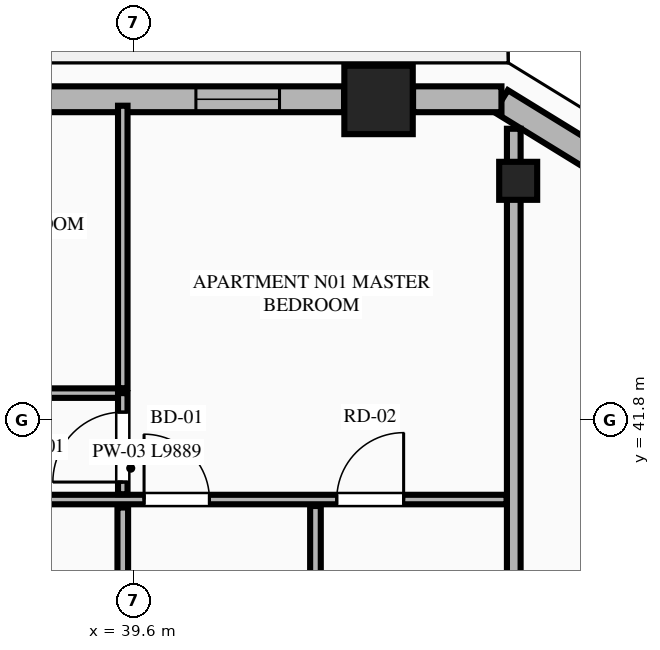
"""IFC4 building model, lengths in metres.
Left out: names, types, materials, properties, quantities, classifications, styles, units other than length and angle.
Written with IfcOpenShell. Run it as: python <this file> out.ifc"""

import sys

from ifc_helpers import new_model, si_unit, direction, frame, frame_2d, origin, origin_2d, place, context, subcontext, project, spatial, rectangle, extrude, element, fill, save


model = new_model("IFC4")
c1 = context("Model", 3, precision=1e-05, world=origin(), true_north=direction((0.0, 1.0)))
c2 = subcontext(c1, "Body", "Model", "MODEL_VIEW")
j1 = project(units=[si_unit("LENGTHUNIT", "METRE"), si_unit("PLANEANGLEUNIT", "RADIAN")], contexts=[c1])
p1 = place(None, origin())
s1 = spatial("IfcSite", under=j1, at=p1, CompositionType="ELEMENT")
p2 = place(p1, origin())
s2 = spatial("IfcBuilding", under=s1, at=p2, CompositionType="ELEMENT")
p3 = place(p2, frame((0.0, 0.0, 186.1)))
s3 = spatial("IfcBuildingStorey", under=s2, at=p3, CompositionType="ELEMENT", Elevation=186.1)
p4 = place(p3, frame((42.821, 46.011, 0.0), z_axis=(0.0, 0.0, 1.0), x_axis=(1.0, 0.0, 0.0)))
e1 = element("IfcColumn", 1, at=p4, inside=s3, PredefinedType="COLUMN", context=c2, shape_type="SweptSolid", body=[
    extrude(rectangle(XDim=0.9, YDim=0.9, at=origin_2d()), origin(), (0.0, 0.0, 1.0), 3.55),
])
p5 = place(p3, frame((44.658, 44.947, 0.0), z_axis=(0.0, 0.0, 1.0), x_axis=(-0.865230187018, 0.501374833306, 0.0)))
e2 = element("IfcColumn", 2, at=p5, inside=s3, PredefinedType="PILASTER", context=c2, shape_type="SweptSolid", body=[
    extrude(rectangle(XDim=0.5, YDim=0.35, at=origin_2d()), origin(), (0.0, 0.0, 1.0), 3.55),
])
p6 = place(p3, frame((45.862, 45.116, 0.0), z_axis=(0.0, 0.0, 1.0), x_axis=(-0.851713271379, 0.524008113828, 0.0)))
e3 = element("IfcWall", 3, at=p6, inside=s3, PredefinedType="STANDARD", context=c2, shape_type="SweptSolid", body=[
    extrude(rectangle(XDim=1.678, YDim=0.34, at=frame_2d((0.839, 0.0))), origin(), (0.0, 0.0, 1.0), 3.35),
])
p7 = place(p3, frame((44.438, 46.02, 0.0), z_axis=(0.0, 0.0, 1.0), x_axis=(-1.0, 0.0, 0.0)))
e4 = element("IfcWall", 4, at=p7, inside=s3, PredefinedType="STANDARD", context=c2, shape_type="SweptSolid", body=[
    extrude(rectangle(XDim=1.163, YDim=0.34, at=frame_2d((0.582, 0.0))), origin(), (0.0, 0.0, 1.0), 3.35),
])
p8 = place(p3, frame((42.367, 46.02, 0.0), z_axis=(0.0, 0.0, 1.0), x_axis=(-1.0, 0.0, 0.0)))
e5 = element("IfcWall", 5, at=p8, inside=s3, PredefinedType="STANDARD", context=c2, shape_type="SweptSolid", body=[
    extrude(rectangle(XDim=5.97, YDim=0.34, at=frame_2d((2.985, 0.0))), origin(), (0.0, 0.0, 1.0), 2.883),
])
p9 = place(p8, frame((0.849, 0.0, 0.75)))
e6 = element("IfcOpeningElement", 6, at=p9, cuts=e5, PredefinedType="OPENING", context=c2, shape_type="SweptSolid", body=[
    extrude(rectangle(XDim=1.1, YDim=1.983, at=frame_2d((0.55, 0.991))), frame((0.0, 0.18, 0.0), z_axis=(0.0, -1.0, 0.0), x_axis=(1.0, 0.0, 0.0)), (0.0, 0.0, 1.0), 0.36),
])
p10 = place(p8, frame((3.947, 0.0, 0.75)))
e7 = element("IfcOpeningElement", 7, at=p10, cuts=e5, PredefinedType="OPENING", context=c2, shape_type="SweptSolid", body=[
    extrude(rectangle(XDim=1.1, YDim=1.983, at=frame_2d((0.55, 0.991))), frame((0.0, 0.18, 0.0), z_axis=(0.0, -1.0, 0.0), x_axis=(1.0, 0.0, 0.0)), (0.0, 0.0, 1.0), 0.36),
])
p11 = place(p3, frame((44.6, 35.15, 0.0), z_axis=(0.0, 0.0, 1.0), x_axis=(0.0, 1.0, 0.0)))
e8 = element("IfcWall", 8, at=p11, inside=s3, PredefinedType="PARTITIONING", context=c2, shape_type="SweptSolid", body=[
    extrude(rectangle(XDim=10.482, YDim=0.18, at=frame_2d((5.241, 0.0))), origin(), (0.0, 0.0, 1.0), 3.35),
])
p12 = place(p3, frame((34.616, 40.754, 0.0), z_axis=(0.0, 0.0, 1.0), x_axis=(1.0, 0.0, 0.0)))
e9 = element("IfcWall", 9, at=p12, inside=s3, PredefinedType="PARTITIONING", context=c2, shape_type="SweptSolid", body=[
    extrude(rectangle(XDim=9.889, YDim=0.125, at=frame_2d((4.944, 0.0))), origin(), (0.0, 0.0, 1.0), 3.35),
])
p13 = place(p12, frame((5.12, 0.0, 0.0)))
e10 = element("IfcOpeningElement", 10, at=p13, cuts=e9, PredefinedType="OPENING", context=c2, shape_type="SweptSolid", body=[
    extrude(rectangle(XDim=0.86, YDim=2.1, at=frame_2d((0.43, 1.05))), frame((0.0, 0.073, 0.0), z_axis=(0.0, -1.0, 0.0), x_axis=(1.0, 0.0, 0.0)), (0.0, 0.0, 1.0), 0.145),
])
p14 = place(p12, frame((7.655, 0.0, 0.0)))
e11 = element("IfcOpeningElement", 11, at=p14, cuts=e9, PredefinedType="OPENING", context=c2, shape_type="SweptSolid", body=[
    extrude(rectangle(XDim=0.88, YDim=2.15, at=frame_2d((0.44, 1.075))), frame((0.0, 0.073, 0.0), z_axis=(0.0, -1.0, 0.0), x_axis=(1.0, 0.0, 0.0)), (0.0, 0.0, 1.0), 0.145),
])
p15 = place(p12, frame((0.3, 0.0, 0.0)))
e12 = element("IfcOpeningElement", 12, at=p15, cuts=e9, PredefinedType="OPENING", context=c2, shape_type="SweptSolid", body=[
    extrude(rectangle(XDim=0.88, YDim=2.15, at=frame_2d((0.44, 1.075))), frame((0.0, 0.073, 0.0), z_axis=(0.0, -1.0, 0.0), x_axis=(1.0, 0.0, 0.0)), (0.0, 0.0, 1.0), 0.145),
])
p16 = place(p3, frame((29.472, 42.154, 0.0), z_axis=(0.0, 0.0, 1.0), x_axis=(1.0, 0.0, 0.0)))
e13 = element("IfcWall", 13, at=p16, inside=s3, PredefinedType="PARTITIONING", context=c2, shape_type="SweptSolid", body=[
    extrude(rectangle(XDim=9.984, YDim=0.125, at=frame_2d((4.992, 0.0))), origin(), (0.0, 0.0, 1.0), 3.35),
])
p17 = place(p16, frame((0.35, 0.0, 0.0)))
e14 = element("IfcOpeningElement", 14, at=p17, cuts=e13, PredefinedType="OPENING", context=c2, shape_type="SweptSolid", body=[
    extrude(rectangle(XDim=0.92, YDim=2.15, at=frame_2d((0.46, 1.075))), frame((0.0, 0.073, 0.0), z_axis=(0.0, -1.0, 0.0), x_axis=(1.0, 0.0, 0.0)), (0.0, 0.0, 1.0), 0.145),
])
p18 = place(p16, frame((5.494, 0.0, 0.0)))
e15 = element("IfcOpeningElement", 15, at=p18, cuts=e13, PredefinedType="OPENING", context=c2, shape_type="SweptSolid", body=[
    extrude(rectangle(XDim=0.92, YDim=2.15, at=frame_2d((0.46, 1.075))), frame((0.0, 0.073, 0.0), z_axis=(0.0, -1.0, 0.0), x_axis=(1.0, 0.0, 0.0)), (0.0, 0.0, 1.0), 0.145),
])
p19 = place(p3, frame((39.456, 40.824, 0.0), z_axis=(0.0, 0.0, 1.0), x_axis=(0.0, 1.0, 0.0)))
e16 = element("IfcWall", 16, at=p19, inside=s3, PredefinedType="PARTITIONING", context=c2, shape_type="SweptSolid", body=[
    extrude(rectangle(XDim=1.33, YDim=0.125, at=frame_2d((0.665, 0.0))), origin(), (0.0, 0.0, 1.0), 3.35),
])
p20 = place(p19, frame((0.16, 0.0, 0.0)))
e17 = element("IfcOpeningElement", 17, at=p20, cuts=e16, PredefinedType="OPENING", context=c2, shape_type="SweptSolid", body=[
    extrude(rectangle(XDim=0.92, YDim=2.15, at=frame_2d((0.46, 1.075))), frame((0.0, 0.073, 0.0), z_axis=(0.0, -1.0, 0.0), x_axis=(1.0, 0.0, 0.0)), (0.0, 0.0, 1.0), 0.145),
])
p21 = place(p3, frame((39.456, 42.219, 0.0), z_axis=(0.0, 0.0, 1.0), x_axis=(0.0, 1.0, 0.0)))
e18 = element("IfcWall", 18, at=p21, inside=s3, PredefinedType="PARTITIONING", context=c2, shape_type="SweptSolid", body=[
    extrude(rectangle(XDim=3.716, YDim=0.125, at=frame_2d((1.858, 0.0))), origin(), (0.0, 0.0, 1.0), 3.35),
])
p22 = place(p3, frame((39.456, 35.235, 0.0), z_axis=(0.0, 0.0, 1.0), x_axis=(0.0, 1.0, 0.0)))
e19 = element("IfcWall", 19, at=p22, inside=s3, PredefinedType="PLUMBINGWALL", context=c2, shape_type="SweptSolid", body=[
    extrude(rectangle(XDim=5.414, YDim=0.14, at=frame_2d((2.707, 0.0))), origin(), (0.0, 0.0, 1.0), 3.35),
])
p23 = place(p3, frame((41.991, 35.235, 0.0), z_axis=(0.0, 0.0, 1.0), x_axis=(0.0, 1.0, 0.0)))
e20 = element("IfcWall", 20, at=p23, inside=s3, PredefinedType="PLUMBINGWALL", context=c2, shape_type="SweptSolid", body=[
    extrude(rectangle(XDim=5.434, YDim=0.14, at=frame_2d((2.717, 0.0))), origin(), (0.0, 0.0, 1.0), 2.807),
])
p24 = place(p9, origin())
e21 = element("IfcWindow", 21, at=p24, inside=s3, PartitioningType="SINGLE_PANEL", PredefinedType="WINDOW", context=c2, shape_type="SweptSolid", body=[
    extrude(rectangle(XDim=1.1, YDim=1.983, at=frame_2d((0.55, 0.991))), frame((0.0, 0.03, 0.0), z_axis=(0.0, -1.0, 0.0), x_axis=(1.0, 0.0, 0.0)), (0.0, 0.0, 1.0), 0.06),
])
fill(e6, e21)
p25 = place(p13, origin())
e22 = element("IfcDoor", 22, at=p25, inside=s3, OperationType="SINGLE_SWING_LEFT", PredefinedType="DOOR", context=c2, shape_type="SweptSolid", body=[
    extrude(rectangle(XDim=0.86, YDim=2.1, at=frame_2d((0.43, 1.05))), frame((0.0, 0.025, 0.0), z_axis=(0.0, -1.0, 0.0), x_axis=(1.0, 0.0, 0.0)), (0.0, 0.0, 1.0), 0.05),
])
fill(e10, e22)
p26 = place(p14, origin())
e23 = element("IfcDoor", 23, at=p26, inside=s3, OperationType="SINGLE_SWING_RIGHT", PredefinedType="DOOR", context=c2, shape_type="SweptSolid", body=[
    extrude(rectangle(XDim=0.88, YDim=2.15, at=frame_2d((0.44, 1.075))), frame((0.0, 0.025, 0.0), z_axis=(0.0, -1.0, 0.0), x_axis=(1.0, 0.0, 0.0)), (0.0, 0.0, 1.0), 0.05),
])
fill(e11, e23)
p27 = place(p20, origin())
e24 = element("IfcDoor", 24, at=p27, inside=s3, OperationType="SINGLE_SWING_LEFT", PredefinedType="DOOR", context=c2, shape_type="SweptSolid", body=[
    extrude(rectangle(XDim=0.92, YDim=2.15, at=frame_2d((0.46, 1.075))), frame((0.0, 0.025, 0.0), z_axis=(0.0, -1.0, 0.0), x_axis=(1.0, 0.0, 0.0)), (0.0, 0.0, 1.0), 0.05),
])
fill(e17, e24)
save(model, sys.argv[1])
